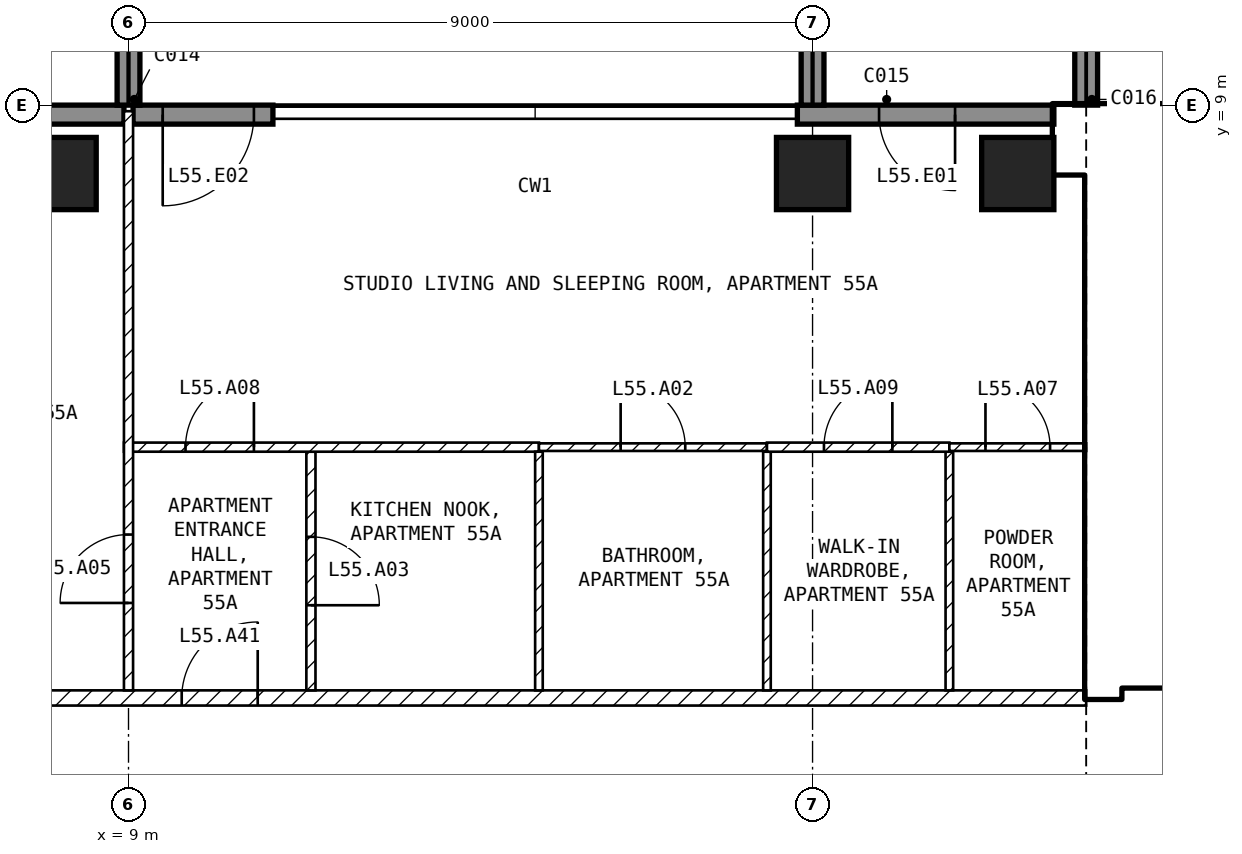
"""IFC4 building model, lengths in metres.
Left out: names, types, materials, properties, quantities, classifications, styles, units other than length and angle.
Written with IfcOpenShell. Run it as: python <this file> out.ifc"""

import sys

from ifc_helpers import new_model, si_unit, direction, frame, frame_2d, origin, origin_2d, place, context, subcontext, project, spatial, rectangle, extrude, element, fill, save


model = new_model("IFC4")
c1 = context("Model", 3, precision=1e-05, world=origin(), true_north=direction((0.0, 1.0)))
c2 = subcontext(c1, "Body", "Model", "MODEL_VIEW")
j1 = project(units=[si_unit("LENGTHUNIT", "METRE"), si_unit("PLANEANGLEUNIT", "RADIAN")], contexts=[c1])
p1 = place(None, origin())
s1 = spatial("IfcSite", under=j1, at=p1, CompositionType="ELEMENT")
p2 = place(p1, origin())
s2 = spatial("IfcBuilding", under=s1, at=p2, CompositionType="ELEMENT")
p3 = place(p2, frame((0.0, 0.0, 219.1)))
s3 = spatial("IfcBuildingStorey", under=s2, at=p3, CompositionType="ELEMENT", Elevation=219.1)
for number, where, z_axis, x_axis in (
    (1, (8.1, 8.1, -0.25), (0.0, 0.0, 1.0), (1.0, 0.0, 0.0)),
    (2, (18.0, 8.1, -0.25), (0.0, 0.0, 1.0), (1.0, 0.0, 0.0)),
    (3, (20.7, 8.1, -0.25), (0.0, 0.0, 1.0), (1.0, 0.0, 0.0)),
):
    element("IfcColumn", number, at=place(p3, frame(where, z_axis=z_axis, x_axis=x_axis)), inside=s3, PredefinedType="COLUMN", context=c2, shape_type="SweptSolid", body=[
        extrude(rectangle(XDim=0.95, YDim=0.95, at=origin_2d()), origin(), (0.0, 0.0, 1.0), 3.45),
    ])
p4 = place(p3, frame((21.175, 8.875, 0.0), z_axis=(0.0, 0.0, 1.0), x_axis=(-1.0, 0.0, 0.0)))
e4 = element("IfcWall", 4, at=p4, inside=s3, PredefinedType="SOLIDWALL", context=c2, shape_type="SweptSolid", body=[
    extrude(rectangle(XDim=3.375, YDim=0.25, at=frame_2d((1.688, 0.0))), origin(), (0.0, 0.0, 1.0), 3.2),
])
p5 = place(p4, frame((1.3, 0.0, 0.0)))
e5 = element("IfcOpeningElement", 5, at=p5, cuts=e4, PredefinedType="OPENING", context=c2, shape_type="SweptSolid", body=[
    extrude(rectangle(XDim=1.0, YDim=2.4, at=frame_2d((0.5, 1.2))), frame((0.0, 0.135, 0.0), z_axis=(0.0, -1.0, 0.0), x_axis=(1.0, 0.0, 0.0)), (0.0, 0.0, 1.0), 0.27),
])
p6 = place(p3, frame((10.9, 8.875, 0.0), z_axis=(0.0, 0.0, 1.0), x_axis=(-1.0, 0.0, 0.0)))
e6 = element("IfcWall", 6, at=p6, inside=s3, PredefinedType="SOLIDWALL", context=c2, shape_type="SweptSolid", body=[
    extrude(rectangle(XDim=1.84, YDim=0.25, at=frame_2d((0.92, 0.0))), origin(), (0.0, 0.0, 1.0), 3.2),
])
p7 = place(p6, frame((0.25, 0.0, 0.0)))
e7 = element("IfcOpeningElement", 7, at=p7, cuts=e6, PredefinedType="OPENING", context=c2, shape_type="SweptSolid", body=[
    extrude(rectangle(XDim=1.2, YDim=2.4, at=frame_2d((0.6, 1.2))), frame((0.0, 0.135, 0.0), z_axis=(0.0, -1.0, 0.0), x_axis=(1.0, 0.0, 0.0)), (0.0, 0.0, 1.0), 0.27),
])
p8 = place(p3, frame((8.94, 8.875, 0.0), z_axis=(0.0, 0.0, 1.0), x_axis=(-1.0, 0.0, 0.0)))
e8 = element("IfcWall", 8, at=p8, inside=s3, PredefinedType="SOLIDWALL", context=c2, shape_type="SweptSolid", body=[
    extrude(rectangle(XDim=3.115, YDim=0.25, at=frame_2d((1.558, 0.0))), origin(), (0.0, 0.0, 1.0), 3.2),
])
p9 = place(p8, frame((1.665, 0.0, 0.0)))
e9 = element("IfcOpeningElement", 9, at=p9, cuts=e8, PredefinedType="OPENING", context=c2, shape_type="SweptSolid", body=[
    extrude(rectangle(XDim=1.2, YDim=2.4, at=frame_2d((0.6, 1.2))), frame((0.0, 0.135, 0.0), z_axis=(0.0, -1.0, 0.0), x_axis=(1.0, 0.0, 0.0)), (0.0, 0.0, 1.0), 0.27),
])
for number, where, z_axis, x_axis in (
    (10, (9.0, 9.0, 0.0), (0.0, 0.0, 1.0), (0.0, 1.0, 0.0)),
    (11, (18.0, 9.0, 0.0), (0.0, 0.0, 1.0), (0.0, 1.0, 0.0)),
    (12, (21.6, 9.0, 0.0), (0.0, 0.0, 1.0), (0.0, 1.0, 0.0)),
):
    element("IfcWall", number, at=place(p3, frame(where, z_axis=z_axis, x_axis=x_axis)), inside=s3, PredefinedType="SOLIDWALL", context=c2, shape_type="SweptSolid", body=[
        extrude(rectangle(XDim=2.7, YDim=0.3, at=frame_2d((1.35, 0.0))), origin(), (0.0, 0.0, 1.0), 3.2),
    ])
p10 = place(p3, frame((21.175, 8.55, 0.0), z_axis=(0.0, 0.0, 1.0), x_axis=(1.0, 0.0, 0.0)))
e13 = element("IfcWall", 13, at=p10, inside=s3, PredefinedType="SHEAR", context=c2, shape_type="SweptSolid", body=[
    extrude(rectangle(XDim=8.425, YDim=0.9, at=frame_2d((4.212, 0.0))), origin(), (0.0, 0.0, 1.0), 3.2),
])
p11 = place(p3, frame((21.825, 1.2, 0.0), z_axis=(0.0, 0.0, 1.0), x_axis=(0.0, 1.0, 0.0)))
e14 = element("IfcWall", 14, at=p11, inside=s3, PredefinedType="SHEAR", context=c2, shape_type="SweptSolid", body=[
    extrude(rectangle(XDim=6.9, YDim=0.45, at=frame_2d((3.45, 0.0))), origin(), (0.0, 0.0, 1.0), 3.2),
])
p12 = place(p3, frame((22.05, 1.45, 0.0), z_axis=(0.0, 0.0, 1.0), x_axis=(1.0, 0.0, 0.0)))
e15 = element("IfcWall", 15, at=p12, inside=s3, PredefinedType="SOLIDWALL", context=c2, shape_type="SweptSolid", body=[
    extrude(rectangle(XDim=11.15, YDim=0.2, at=frame_2d((5.575, 0.0))), origin(), (0.0, 0.0, 1.0), 3.2),
])
p13 = place(p12, frame((0.75, 0.0, 0.0)))
e16 = element("IfcOpeningElement", 16, at=p13, cuts=e15, PredefinedType="OPENING", context=c2, shape_type="SweptSolid", body=[
    extrude(rectangle(XDim=1.0, YDim=2.1, at=frame_2d((0.5, 1.05))), frame((0.0, 0.11, 0.0), z_axis=(0.0, -1.0, 0.0), x_axis=(1.0, 0.0, 0.0)), (0.0, 0.0, 1.0), 0.22),
])
p14 = place(p12, frame((3.25, 0.0, 0.0)))
e17 = element("IfcOpeningElement", 17, at=p14, cuts=e15, PredefinedType="OPENING", context=c2, shape_type="SweptSolid", body=[
    extrude(rectangle(XDim=1.0, YDim=2.1, at=frame_2d((0.5, 1.05))), frame((0.0, 0.11, 0.0), z_axis=(0.0, -1.0, 0.0), x_axis=(1.0, 0.0, 0.0)), (0.0, 0.0, 1.0), 0.22),
])
p15 = place(p12, frame((9.15, 0.0, 0.0)))
e18 = element("IfcOpeningElement", 18, at=p15, cuts=e15, PredefinedType="OPENING", context=c2, shape_type="SweptSolid", body=[
    extrude(rectangle(XDim=0.9, YDim=2.1, at=frame_2d((0.45, 1.05))), frame((0.0, 0.11, 0.0), z_axis=(0.0, -1.0, 0.0), x_axis=(1.0, 0.0, 0.0)), (0.0, 0.0, 1.0), 0.22),
])
p16 = place(p3, frame((22.05, 5.15, 0.0), z_axis=(0.0, 0.0, 1.0), x_axis=(1.0, 0.0, 0.0)))
e19 = element("IfcWall", 19, at=p16, inside=s3, PredefinedType="SOLIDWALL", context=c2, shape_type="SweptSolid", body=[
    extrude(rectangle(XDim=6.3, YDim=0.2, at=frame_2d((3.15, 0.0))), origin(), (0.0, 0.0, 1.0), 3.2),
])
p17 = place(p16, frame((0.2, 0.0, 0.0)))
e20 = element("IfcOpeningElement", 20, at=p17, cuts=e19, PredefinedType="OPENING", context=c2, shape_type="SweptSolid", body=[
    extrude(rectangle(XDim=1.0, YDim=2.1, at=frame_2d((0.5, 1.05))), frame((0.0, 0.11, 0.0), z_axis=(0.0, -1.0, 0.0), x_axis=(1.0, 0.0, 0.0)), (0.0, 0.0, 1.0), 0.22),
])
p18 = place(p3, frame((4.4, 1.2, 0.0), z_axis=(0.0, 0.0, 1.0), x_axis=(1.0, 0.0, 0.0)))
e21 = element("IfcWall", 21, at=p18, inside=s3, PredefinedType="PARTITIONING", context=c2, shape_type="SweptSolid", body=[
    extrude(rectangle(XDim=17.2, YDim=0.2, at=frame_2d((8.6, 0.0))), origin(), (0.0, 0.0, 1.0), 3.2),
])
p19 = place(p18, frame((5.3, 0.0, 0.0)))
e22 = element("IfcOpeningElement", 22, at=p19, cuts=e21, PredefinedType="OPENING", context=c2, shape_type="SweptSolid", body=[
    extrude(rectangle(XDim=1.0, YDim=2.1, at=frame_2d((0.5, 1.05))), frame((0.0, 0.11, 0.0), z_axis=(0.0, -1.0, 0.0), x_axis=(1.0, 0.0, 0.0)), (0.0, 0.0, 1.0), 0.22),
])
p20 = place(p3, frame((11.4, 4.44, 0.0), z_axis=(0.0, 0.0, 1.0), x_axis=(0.0, -1.0, 0.0)))
e23 = element("IfcWall", 23, at=p20, inside=s3, PredefinedType="PARTITIONING", context=c2, shape_type="SweptSolid", body=[
    extrude(rectangle(XDim=3.14, YDim=0.12, at=frame_2d((1.57, 0.0))), origin(), (0.0, 0.0, 1.0), 3.2),
])
p21 = place(p20, frame((1.12, 0.0, 0.0)))
e24 = element("IfcOpeningElement", 24, at=p21, cuts=e23, PredefinedType="OPENING", context=c2, shape_type="SweptSolid", body=[
    extrude(rectangle(XDim=0.9, YDim=2.1, at=frame_2d((0.45, 1.05))), frame((0.0, 0.07, 0.0), z_axis=(0.0, -1.0, 0.0), x_axis=(1.0, 0.0, 0.0)), (0.0, 0.0, 1.0), 0.14),
])
p22 = place(p3, frame((8.94, 4.5, 0.0), z_axis=(0.0, 0.0, 1.0), x_axis=(1.0, 0.0, 0.0)))
e25 = element("IfcWall", 25, at=p22, inside=s3, PredefinedType="PARTITIONING", context=c2, shape_type="SweptSolid", body=[
    extrude(rectangle(XDim=5.46, YDim=0.12, at=frame_2d((2.73, 0.0))), origin(), (0.0, 0.0, 1.0), 3.2),
])
p23 = place(p22, frame((0.81, 0.0, 0.0)))
e26 = element("IfcOpeningElement", 26, at=p23, cuts=e25, PredefinedType="OPENING", context=c2, shape_type="SweptSolid", body=[
    extrude(rectangle(XDim=0.9, YDim=2.1, at=frame_2d((0.45, 1.05))), frame((0.0, 0.07, 0.0), z_axis=(0.0, -1.0, 0.0), x_axis=(1.0, 0.0, 0.0)), (0.0, 0.0, 1.0), 0.14),
])
p24 = place(p3, frame((9.0, 1.3, 0.0), z_axis=(0.0, 0.0, 1.0), x_axis=(0.0, 1.0, 0.0)))
e27 = element("IfcWall", 27, at=p24, inside=s3, PredefinedType="PARTITIONING", context=c2, shape_type="SweptSolid", body=[
    extrude(rectangle(XDim=7.62, YDim=0.12, at=frame_2d((3.81, 0.0))), origin(), (0.0, 0.0, 1.0), 3.2),
])
p25 = place(p24, frame((1.15, 0.0, 0.0)))
e28 = element("IfcOpeningElement", 28, at=p25, cuts=e27, PredefinedType="OPENING", context=c2, shape_type="SweptSolid", body=[
    extrude(rectangle(XDim=0.9, YDim=2.1, at=frame_2d((0.45, 1.05))), frame((0.0, 0.07, 0.0), z_axis=(0.0, -1.0, 0.0), x_axis=(1.0, 0.0, 0.0)), (0.0, 0.0, 1.0), 0.14),
])
for number, where, z_axis, x_axis in (
    (29, (14.4, 4.44, 0.0), (0.0, 0.0, 1.0), (0.0, -1.0, 0.0)),
    (30, (17.4, 4.44, 0.0), (0.0, 0.0, 1.0), (0.0, -1.0, 0.0)),
):
    element("IfcWall", number, at=place(p3, frame(where, z_axis=z_axis, x_axis=x_axis)), inside=s3, PredefinedType="PARTITIONING", context=c2, shape_type="SweptSolid", body=[
        extrude(rectangle(XDim=3.14, YDim=0.1, at=frame_2d((1.57, 0.0))), origin(), (0.0, 0.0, 1.0), 3.2),
    ])
p26 = place(p3, frame((14.4, 4.5, 0.0), z_axis=(0.0, 0.0, 1.0), x_axis=(1.0, 0.0, 0.0)))
e31 = element("IfcWall", 31, at=p26, inside=s3, PredefinedType="PARTITIONING", context=c2, shape_type="SweptSolid", body=[
    extrude(rectangle(XDim=3.0, YDim=0.1, at=frame_2d((1.5, 0.0))), origin(), (0.0, 0.0, 1.0), 3.2),
])
p27 = place(p26, frame((1.075, 0.0, 0.0)))
e32 = element("IfcOpeningElement", 32, at=p27, cuts=e31, PredefinedType="OPENING", context=c2, shape_type="SweptSolid", body=[
    extrude(rectangle(XDim=0.85, YDim=2.1, at=frame_2d((0.425, 1.05))), frame((0.0, 0.06, 0.0), z_axis=(0.0, -1.0, 0.0), x_axis=(1.0, 0.0, 0.0)), (0.0, 0.0, 1.0), 0.12),
])
p28 = place(p3, frame((19.8, 4.44, 0.0), z_axis=(0.0, 0.0, 1.0), x_axis=(0.0, -1.0, 0.0)))
e33 = element("IfcWall", 33, at=p28, inside=s3, PredefinedType="PARTITIONING", context=c2, shape_type="SweptSolid", body=[
    extrude(rectangle(XDim=3.14, YDim=0.1, at=frame_2d((1.57, 0.0))), origin(), (0.0, 0.0, 1.0), 3.2),
])
p29 = place(p3, frame((17.4, 4.5, 0.0), z_axis=(0.0, 0.0, 1.0), x_axis=(1.0, 0.0, 0.0)))
e34 = element("IfcWall", 34, at=p29, inside=s3, PredefinedType="PARTITIONING", context=c2, shape_type="SweptSolid", body=[
    extrude(rectangle(XDim=2.4, YDim=0.12, at=frame_2d((1.2, 0.0))), origin(), (0.0, 0.0, 1.0), 3.2),
])
p30 = place(p29, frame((0.75, 0.0, 0.0)))
e35 = element("IfcOpeningElement", 35, at=p30, cuts=e34, PredefinedType="OPENING", context=c2, shape_type="SweptSolid", body=[
    extrude(rectangle(XDim=0.9, YDim=2.1, at=frame_2d((0.45, 1.05))), frame((0.0, 0.07, 0.0), z_axis=(0.0, -1.0, 0.0), x_axis=(1.0, 0.0, 0.0)), (0.0, 0.0, 1.0), 0.14),
])
p31 = place(p3, frame((19.8, 4.5, 0.0), z_axis=(0.0, 0.0, 1.0), x_axis=(1.0, 0.0, 0.0)))
e36 = element("IfcWall", 36, at=p31, inside=s3, PredefinedType="PARTITIONING", context=c2, shape_type="SweptSolid", body=[
    extrude(rectangle(XDim=1.8, YDim=0.1, at=frame_2d((0.9, 0.0))), origin(), (0.0, 0.0, 1.0), 3.2),
])
p32 = place(p31, frame((0.475, 0.0, 0.0)))
e37 = element("IfcOpeningElement", 37, at=p32, cuts=e36, PredefinedType="OPENING", context=c2, shape_type="SweptSolid", body=[
    extrude(rectangle(XDim=0.85, YDim=2.1, at=frame_2d((0.425, 1.05))), frame((0.0, 0.06, 0.0), z_axis=(0.0, -1.0, 0.0), x_axis=(1.0, 0.0, 0.0)), (0.0, 0.0, 1.0), 0.12),
])
p33 = place(p5, origin())
e38 = element("IfcDoor", 38, at=p33, inside=s3, OperationType="SINGLE_SWING_LEFT", PredefinedType="DOOR", context=c2, shape_type="SweptSolid", body=[
    extrude(rectangle(XDim=1.0, YDim=2.4, at=frame_2d((0.5, 1.2))), frame((0.0, 0.025, 0.0), z_axis=(0.0, -1.0, 0.0), x_axis=(1.0, 0.0, 0.0)), (0.0, 0.0, 1.0), 0.05),
])
fill(e5, e38)
p34 = place(p7, origin())
e39 = element("IfcDoor", 39, at=p34, inside=s3, OperationType="SINGLE_SWING_RIGHT", PredefinedType="DOOR", context=c2, shape_type="SweptSolid", body=[
    extrude(rectangle(XDim=1.2, YDim=2.4, at=frame_2d((0.6, 1.2))), frame((0.0, 0.025, 0.0), z_axis=(0.0, -1.0, 0.0), x_axis=(1.0, 0.0, 0.0)), (0.0, 0.0, 1.0), 0.05),
])
fill(e7, e39)
p35 = place(p17, origin())
e40 = element("IfcDoor", 40, at=p35, inside=s3, OperationType="SINGLE_SWING_LEFT", PredefinedType="DOOR", context=c2, shape_type="SweptSolid", body=[
    extrude(rectangle(XDim=1.0, YDim=2.1, at=frame_2d((0.5, 1.05))), frame((0.0, 0.025, 0.0), z_axis=(0.0, -1.0, 0.0), x_axis=(1.0, 0.0, 0.0)), (0.0, 0.0, 1.0), 0.05),
])
fill(e20, e40)
p36 = place(p27, origin())
e41 = element("IfcDoor", 41, at=p36, inside=s3, OperationType="SINGLE_SWING_LEFT", PredefinedType="DOOR", context=c2, shape_type="SweptSolid", body=[
    extrude(rectangle(XDim=0.85, YDim=2.1, at=frame_2d((0.425, 1.05))), frame((0.0, 0.025, 0.0), z_axis=(0.0, -1.0, 0.0), x_axis=(1.0, 0.0, 0.0)), (0.0, 0.0, 1.0), 0.05),
])
fill(e32, e41)
p37 = place(p21, origin())
e42 = element("IfcDoor", 42, at=p37, inside=s3, OperationType="SINGLE_SWING_RIGHT", PredefinedType="DOOR", context=c2, shape_type="SweptSolid", body=[
    extrude(rectangle(XDim=0.9, YDim=2.1, at=frame_2d((0.45, 1.05))), frame((0.0, 0.025, 0.0), z_axis=(0.0, -1.0, 0.0), x_axis=(1.0, 0.0, 0.0)), (0.0, 0.0, 1.0), 0.05),
])
fill(e24, e42)
p38 = place(p25, origin())
e43 = element("IfcDoor", 43, at=p38, inside=s3, OperationType="SINGLE_SWING_LEFT", PredefinedType="DOOR", context=c2, shape_type="SweptSolid", body=[
    extrude(rectangle(XDim=0.9, YDim=2.1, at=frame_2d((0.45, 1.05))), frame((0.0, 0.025, 0.0), z_axis=(0.0, -1.0, 0.0), x_axis=(1.0, 0.0, 0.0)), (0.0, 0.0, 1.0), 0.05),
])
fill(e28, e43)
p39 = place(p32, origin())
e44 = element("IfcDoor", 44, at=p39, inside=s3, OperationType="SINGLE_SWING_LEFT", PredefinedType="DOOR", context=c2, shape_type="SweptSolid", body=[
    extrude(rectangle(XDim=0.85, YDim=2.1, at=frame_2d((0.425, 1.05))), frame((0.0, 0.025, 0.0), z_axis=(0.0, -1.0, 0.0), x_axis=(1.0, 0.0, 0.0)), (0.0, 0.0, 1.0), 0.05),
])
fill(e37, e44)
p40 = place(p23, origin())
e45 = element("IfcDoor", 45, at=p40, inside=s3, OperationType="SINGLE_SWING_RIGHT", PredefinedType="DOOR", context=c2, shape_type="SweptSolid", body=[
    extrude(rectangle(XDim=0.9, YDim=2.1, at=frame_2d((0.45, 1.05))), frame((0.0, 0.025, 0.0), z_axis=(0.0, -1.0, 0.0), x_axis=(1.0, 0.0, 0.0)), (0.0, 0.0, 1.0), 0.05),
])
fill(e26, e45)
p41 = place(p30, origin())
e46 = element("IfcDoor", 46, at=p41, inside=s3, OperationType="SINGLE_SWING_RIGHT", PredefinedType="DOOR", context=c2, shape_type="SweptSolid", body=[
    extrude(rectangle(XDim=0.9, YDim=2.1, at=frame_2d((0.45, 1.05))), frame((0.0, 0.025, 0.0), z_axis=(0.0, -1.0, 0.0), x_axis=(1.0, 0.0, 0.0)), (0.0, 0.0, 1.0), 0.05),
])
fill(e35, e46)
p42 = place(p19, origin())
e47 = element("IfcDoor", 47, at=p42, inside=s3, OperationType="SINGLE_SWING_RIGHT", PredefinedType="DOOR", context=c2, shape_type="SweptSolid", body=[
    extrude(rectangle(XDim=1.0, YDim=2.1, at=frame_2d((0.5, 1.05))), frame((0.0, 0.025, 0.0), z_axis=(0.0, -1.0, 0.0), x_axis=(1.0, 0.0, 0.0)), (0.0, 0.0, 1.0), 0.05),
])
fill(e22, e47)
save(model, sys.argv[1])
